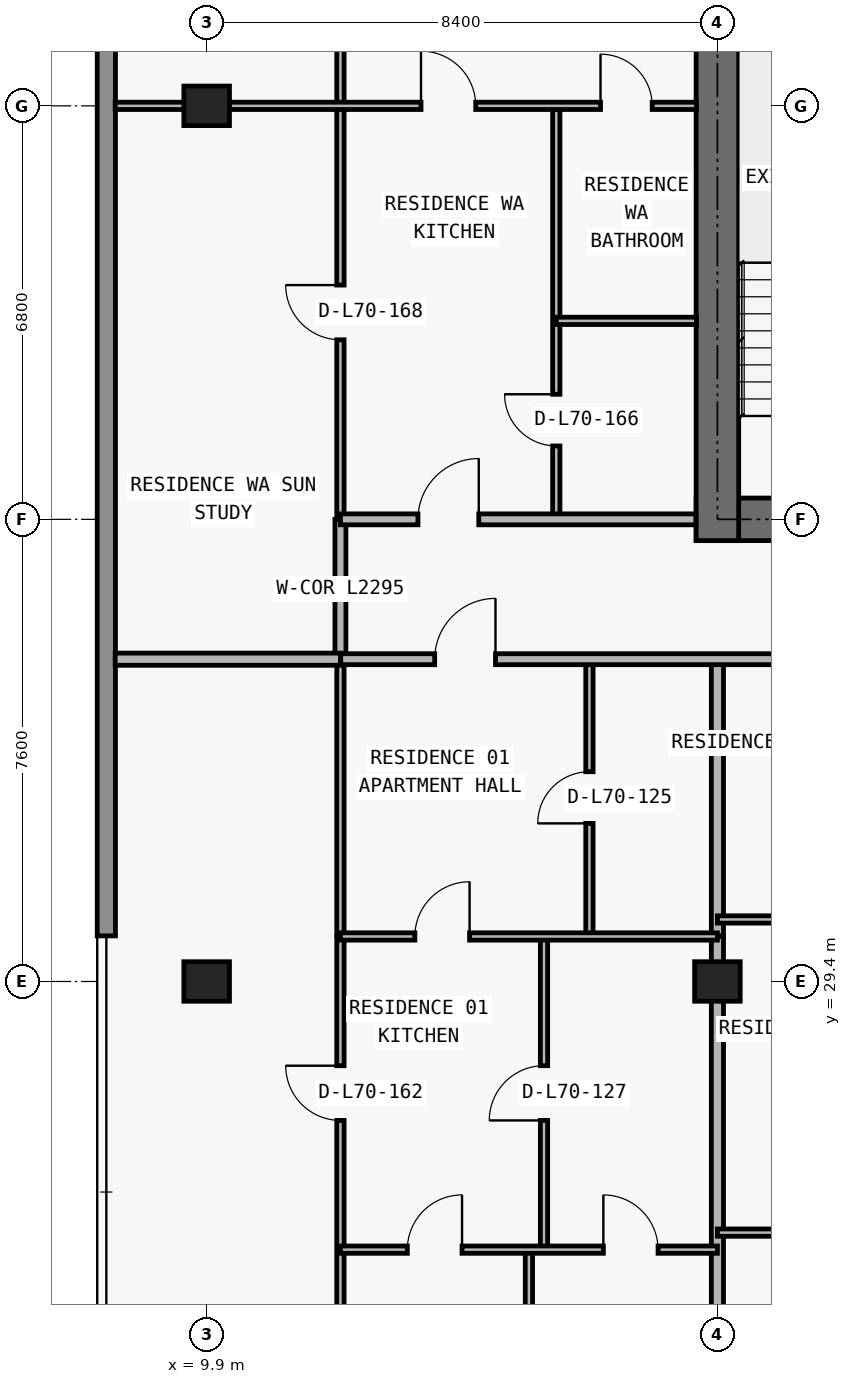
"""IFC4 building model, lengths in metres.
Left out: names, types, materials, properties, quantities, classifications, styles, units other than length and angle.
Written with IfcOpenShell. Run it as: python <this file> out.ifc"""

import sys

from ifc_helpers import new_model, si_unit, direction, frame, frame_2d, origin, origin_2d, place, context, subcontext, project, spatial, rectangle, extrude, element, fill, save


model = new_model("IFC4")
c1 = context("Model", 3, precision=1e-05, world=origin(), true_north=direction((0.0, 1.0)))
c2 = subcontext(c1, "Body", "Model", "MODEL_VIEW")
j1 = project(units=[si_unit("LENGTHUNIT", "METRE"), si_unit("PLANEANGLEUNIT", "RADIAN")], contexts=[c1])
p1 = place(None, origin())
s1 = spatial("IfcSite", under=j1, at=p1, CompositionType="ELEMENT")
p2 = place(p1, origin())
s2 = spatial("IfcBuilding", under=s1, at=p2, CompositionType="ELEMENT")
p3 = place(p2, frame((0.0, 0.0, 249.6)))
s3 = spatial("IfcBuildingStorey", under=s2, at=p3, CompositionType="ELEMENT", Elevation=249.6)
for number, where, z_axis, x_axis in (
    (1, (9.9, 29.4, 0.0), (0.0, 0.0, 1.0), (1.0, 0.0, 0.0)),
    (2, (18.3, 29.4, 0.0), (0.0, 0.0, 1.0), (1.0, 0.0, 0.0)),
    (3, (9.9, 43.8, 0.0), (0.0, 0.0, 1.0), (1.0, 0.0, 0.0)),
):
    element("IfcColumn", number, at=place(p3, frame(where, z_axis=z_axis, x_axis=x_axis)), inside=s3, PredefinedType="COLUMN", context=c2, shape_type="SweptSolid", body=[
        extrude(rectangle(XDim=0.75, YDim=0.65, at=origin_2d()), origin(), (0.0, 0.0, 1.0), 3.05),
    ])
p4 = place(p3, frame((17.95, 37.0, 0.0), z_axis=(0.0, 0.0, 1.0), x_axis=(1.0, 0.0, 0.0)))
e4 = element("IfcWall", 4, at=p4, inside=s3, PredefinedType="SHEAR", context=c2, shape_type="SweptSolid", body=[
    extrude(rectangle(XDim=41.9, YDim=0.7, at=frame_2d((20.95, 0.0))), origin(), (0.0, 0.0, 1.0), 3.05),
])
p5 = place(p4, frame((14.35, 0.0, 0.0)))
e5 = element("IfcOpeningElement", 5, at=p5, cuts=e4, PredefinedType="OPENING", context=c2, shape_type="SweptSolid", body=[
    extrude(rectangle(XDim=1.1, YDim=2.15, at=frame_2d((0.55, 1.075))), frame((0.0, 0.36, 0.0), z_axis=(0.0, -1.0, 0.0), x_axis=(1.0, 0.0, 0.0)), (0.0, 0.0, 1.0), 0.72),
])
p6 = place(p4, frame((6.2, 0.0, 0.0)))
e6 = element("IfcOpeningElement", 6, at=p6, cuts=e4, PredefinedType="OPENING", context=c2, shape_type="SweptSolid", body=[
    extrude(rectangle(XDim=1.05, YDim=2.15, at=frame_2d((0.525, 1.075))), frame((0.0, 0.36, 0.0), z_axis=(0.0, -1.0, 0.0), x_axis=(1.0, 0.0, 0.0)), (0.0, 0.0, 1.0), 0.72),
])
p7 = place(p4, frame((34.7, 0.0, 0.0)))
e7 = element("IfcOpeningElement", 7, at=p7, cuts=e4, PredefinedType="OPENING", context=c2, shape_type="SweptSolid", body=[
    extrude(rectangle(XDim=1.05, YDim=2.15, at=frame_2d((0.525, 1.075))), frame((0.0, 0.36, 0.0), z_axis=(0.0, -1.0, 0.0), x_axis=(1.0, 0.0, 0.0)), (0.0, 0.0, 1.0), 0.72),
])
p8 = place(p4, frame((10.812, 0.0, 0.0)))
e8 = element("IfcOpeningElement", 8, at=p8, cuts=e4, PredefinedType="OPENING", context=c2, shape_type="SweptSolid", body=[
    extrude(rectangle(XDim=1.05, YDim=2.15, at=frame_2d((0.525, 1.075))), frame((0.0, 0.36, 0.0), z_axis=(0.0, -1.0, 0.0), x_axis=(1.0, 0.0, 0.0)), (0.0, 0.0, 1.0), 0.72),
])
p9 = place(p4, frame((24.05, 0.0, 0.0)))
e9 = element("IfcOpeningElement", 9, at=p9, cuts=e4, PredefinedType="OPENING", context=c2, shape_type="SweptSolid", body=[
    extrude(rectangle(XDim=1.05, YDim=2.15, at=frame_2d((0.525, 1.075))), frame((0.0, 0.36, 0.0), z_axis=(0.0, -1.0, 0.0), x_axis=(1.0, 0.0, 0.0)), (0.0, 0.0, 1.0), 0.72),
])
p10 = place(p3, frame((18.3, 36.65, 0.0), z_axis=(0.0, 0.0, 1.0), x_axis=(0.0, 1.0, 0.0)))
e10 = element("IfcWall", 10, at=p10, inside=s3, PredefinedType="SHEAR", context=c2, shape_type="SweptSolid", body=[
    extrude(rectangle(XDim=13.95, YDim=0.7, at=frame_2d((6.975, 0.0))), origin(), (0.0, 0.0, 1.0), 3.05),
])
p11 = place(p3, frame((8.25, 30.15, 0.0), z_axis=(0.0, 0.0, 1.0), x_axis=(0.0, 1.0, 0.0)))
e11 = element("IfcWall", 11, at=p11, inside=s3, PredefinedType="STANDARD", context=c2, shape_type="SweptSolid", body=[
    extrude(rectangle(XDim=16.85, YDim=0.3, at=frame_2d((8.425, 0.0))), origin(), (0.0, 0.0, 1.0), 3.05),
])
p12 = place(p3, frame((12.1, 13.385, 0.0), z_axis=(0.0, 0.0, 1.0), x_axis=(0.0, 1.0, 0.0)))
e12 = element("IfcWall", 12, at=p12, inside=s3, PredefinedType="PARTITIONING", context=c2, shape_type="SweptSolid", body=[
    extrude(rectangle(XDim=16.755, YDim=0.12, at=frame_2d((8.377, 0.0))), origin(), (0.0, 0.0, 1.0), 2.578),
])
p13 = place(p12, frame((13.73, 0.0, 0.0)))
e13 = element("IfcOpeningElement", 13, at=p13, cuts=e12, PredefinedType="OPENING", context=c2, shape_type="SweptSolid", body=[
    extrude(rectangle(XDim=0.9, YDim=2.15, at=frame_2d((0.45, 1.075))), frame((0.0, 0.07, 0.0), z_axis=(0.0, -1.0, 0.0), x_axis=(1.0, 0.0, 0.0)), (0.0, 0.0, 1.0), 0.14),
])
p14 = place(p3, frame((12.1, 30.15, 0.0), z_axis=(0.0, 0.0, 1.0), x_axis=(0.0, 1.0, 0.0)))
e14 = element("IfcWall", 14, at=p14, inside=s3, PredefinedType="PARTITIONING", context=c2, shape_type="SweptSolid", body=[
    extrude(rectangle(XDim=4.55, YDim=0.12, at=frame_2d((2.275, 0.0))), origin(), (0.0, 0.0, 1.0), 2.578),
])
p15 = place(p3, frame((12.1, 34.705, 0.0), z_axis=(0.0, 0.0, 1.0), x_axis=(0.0, 1.0, 0.0)))
e15 = element("IfcWall", 15, at=p15, inside=s3, PredefinedType="PARTITIONING", context=c2, shape_type="SweptSolid", body=[
    extrude(rectangle(XDim=2.295, YDim=0.18, at=frame_2d((1.147, 0.0))), origin(), (0.0, 0.0, 1.0), 2.578),
])
p16 = place(p3, frame((12.1, 37.005, 0.0), z_axis=(0.0, 0.0, 1.0), x_axis=(0.0, 1.0, 0.0)))
e16 = element("IfcWall", 16, at=p16, inside=s3, PredefinedType="PARTITIONING", context=c2, shape_type="SweptSolid", body=[
    extrude(rectangle(XDim=9.875, YDim=0.12, at=frame_2d((4.938, 0.0))), origin(), (0.0, 0.0, 1.0), 2.578),
])
p17 = place(p16, frame((2.948, 0.0, 0.0)))
e17 = element("IfcOpeningElement", 17, at=p17, cuts=e16, PredefinedType="OPENING", context=c2, shape_type="SweptSolid", body=[
    extrude(rectangle(XDim=0.9, YDim=2.15, at=frame_2d((0.45, 1.075))), frame((0.0, 0.07, 0.0), z_axis=(0.0, -1.0, 0.0), x_axis=(1.0, 0.0, 0.0)), (0.0, 0.0, 1.0), 0.14),
])
p18 = place(p16, frame((7.885, 0.0, 0.0)))
e18 = element("IfcOpeningElement", 18, at=p18, cuts=e16, PredefinedType="OPENING", context=c2, shape_type="SweptSolid", body=[
    extrude(rectangle(XDim=0.9, YDim=2.15, at=frame_2d((0.45, 1.075))), frame((0.0, 0.07, 0.0), z_axis=(0.0, -1.0, 0.0), x_axis=(1.0, 0.0, 0.0)), (0.0, 0.0, 1.0), 0.14),
])
p19 = place(p3, frame((15.2, 13.34, 0.0), z_axis=(0.0, 0.0, 1.0), x_axis=(0.0, 1.0, 0.0)))
e19 = element("IfcWall", 19, at=p19, inside=s3, PredefinedType="PARTITIONING", context=c2, shape_type="SweptSolid", body=[
    extrude(rectangle(XDim=11.65, YDim=0.12, at=frame_2d((5.825, 0.0))), origin(), (0.0, 0.0, 1.0), 3.05),
])
p20 = place(p3, frame((15.448, 24.99, 0.0), z_axis=(0.0, 0.0, 1.0), x_axis=(0.0, 1.0, 0.0)))
e20 = element("IfcWall", 20, at=p20, inside=s3, PredefinedType="PARTITIONING", context=c2, shape_type="SweptSolid", body=[
    extrude(rectangle(XDim=5.15, YDim=0.12, at=frame_2d((2.575, 0.0))), origin(), (0.0, 0.0, 1.0), 3.05),
])
p21 = place(p20, frame((2.125, 0.0, 0.0)))
e21 = element("IfcOpeningElement", 21, at=p21, cuts=e20, PredefinedType="OPENING", context=c2, shape_type="SweptSolid", body=[
    extrude(rectangle(XDim=0.9, YDim=2.15, at=frame_2d((0.45, 1.075))), frame((0.0, 0.07, 0.0), z_axis=(0.0, -1.0, 0.0), x_axis=(1.0, 0.0, 0.0)), (0.0, 0.0, 1.0), 0.14),
])
p22 = place(p3, frame((15.65, 37.0, 0.0), z_axis=(0.0, 0.0, 1.0), x_axis=(0.0, 1.0, 0.0)))
e22 = element("IfcWall", 22, at=p22, inside=s3, PredefinedType="PARTITIONING", context=c2, shape_type="SweptSolid", body=[
    extrude(rectangle(XDim=6.8, YDim=0.12, at=frame_2d((3.4, 0.0))), origin(), (0.0, 0.0, 1.0), 3.05),
])
p23 = place(p22, frame((1.207, 0.0, 0.0)))
e23 = element("IfcOpeningElement", 23, at=p23, cuts=e22, PredefinedType="OPENING", context=c2, shape_type="SweptSolid", body=[
    extrude(rectangle(XDim=0.85, YDim=2.1, at=frame_2d((0.425, 1.05))), frame((0.0, 0.07, 0.0), z_axis=(0.0, -1.0, 0.0), x_axis=(1.0, 0.0, 0.0)), (0.0, 0.0, 1.0), 0.14),
])
p24 = place(p3, frame((16.195, 30.15, 0.0), z_axis=(0.0, 0.0, 1.0), x_axis=(0.0, 1.0, 0.0)))
e24 = element("IfcWall", 24, at=p24, inside=s3, PredefinedType="PARTITIONING", context=c2, shape_type="SweptSolid", body=[
    extrude(rectangle(XDim=4.55, YDim=0.12, at=frame_2d((2.275, 0.0))), origin(), (0.0, 0.0, 1.0), 3.05),
])
p25 = place(p24, frame((1.85, 0.0, 0.0)))
e25 = element("IfcOpeningElement", 25, at=p25, cuts=e24, PredefinedType="OPENING", context=c2, shape_type="SweptSolid", body=[
    extrude(rectangle(XDim=0.85, YDim=2.1, at=frame_2d((0.425, 1.05))), frame((0.0, 0.07, 0.0), z_axis=(0.0, -1.0, 0.0), x_axis=(1.0, 0.0, 0.0)), (0.0, 0.0, 1.0), 0.14),
])
p26 = place(p3, frame((18.3, 13.34, 0.0), z_axis=(0.0, 0.0, 1.0), x_axis=(0.0, 1.0, 0.0)))
e26 = element("IfcWall", 26, at=p26, inside=s3, PredefinedType="PARTITIONING", context=c2, shape_type="SweptSolid", body=[
    extrude(rectangle(XDim=16.8, YDim=0.2, at=frame_2d((8.4, 0.0))), origin(), (0.0, 0.0, 1.0), 2.263),
])
p27 = place(p3, frame((18.3, 30.15, 0.0), z_axis=(0.0, 0.0, 1.0), x_axis=(0.0, 1.0, 0.0)))
e27 = element("IfcWall", 27, at=p27, inside=s3, PredefinedType="PARTITIONING", context=c2, shape_type="SweptSolid", body=[
    extrude(rectangle(XDim=4.55, YDim=0.2, at=frame_2d((2.275, 0.0))), origin(), (0.0, 0.0, 1.0), 2.263),
])
p28 = place(p3, frame((12.1, 24.99, 0.0), z_axis=(0.0, 0.0, 1.0), x_axis=(1.0, 0.0, 0.0)))
e28 = element("IfcWall", 28, at=p28, inside=s3, PredefinedType="PARTITIONING", context=c2, shape_type="SweptSolid", body=[
    extrude(rectangle(XDim=6.2, YDim=0.12, at=frame_2d((3.1, 0.0))), origin(), (0.0, 0.0, 1.0), 3.05),
])
p29 = place(p28, frame((1.1, 0.0, 0.0)))
e29 = element("IfcOpeningElement", 29, at=p29, cuts=e28, PredefinedType="OPENING", context=c2, shape_type="SweptSolid", body=[
    extrude(rectangle(XDim=0.9, YDim=2.15, at=frame_2d((0.45, 1.075))), frame((0.0, 0.07, 0.0), z_axis=(0.0, -1.0, 0.0), x_axis=(1.0, 0.0, 0.0)), (0.0, 0.0, 1.0), 0.14),
])
p30 = place(p28, frame((4.324, 0.0, 0.0)))
e30 = element("IfcOpeningElement", 30, at=p30, cuts=e28, PredefinedType="OPENING", context=c2, shape_type="SweptSolid", body=[
    extrude(rectangle(XDim=0.9, YDim=2.15, at=frame_2d((0.45, 1.075))), frame((0.0, 0.07, 0.0), z_axis=(0.0, -1.0, 0.0), x_axis=(1.0, 0.0, 0.0)), (0.0, 0.0, 1.0), 0.14),
])
p31 = place(p3, frame((18.3, 25.27, 0.0), z_axis=(0.0, 0.0, 1.0), x_axis=(1.0, 0.0, 0.0)))
e31 = element("IfcWall", 31, at=p31, inside=s3, PredefinedType="PARTITIONING", context=c2, shape_type="SweptSolid", body=[
    extrude(rectangle(XDim=8.18, YDim=0.12, at=frame_2d((4.09, 0.0))), origin(), (0.0, 0.0, 1.0), 3.05),
])
p32 = place(p31, frame((1.86, 0.0, 0.0)))
e32 = element("IfcOpeningElement", 32, at=p32, cuts=e31, PredefinedType="OPENING", context=c2, shape_type="SweptSolid", body=[
    extrude(rectangle(XDim=0.9, YDim=2.15, at=frame_2d((0.45, 1.075))), frame((0.0, 0.07, 0.0), z_axis=(0.0, -1.0, 0.0), x_axis=(1.0, 0.0, 0.0)), (0.0, 0.0, 1.0), 0.14),
])
p33 = place(p31, frame((6.033, 0.0, 0.0)))
e33 = element("IfcOpeningElement", 33, at=p33, cuts=e31, PredefinedType="OPENING", context=c2, shape_type="SweptSolid", body=[
    extrude(rectangle(XDim=0.9, YDim=2.15, at=frame_2d((0.45, 1.075))), frame((0.0, 0.07, 0.0), z_axis=(0.0, -1.0, 0.0), x_axis=(1.0, 0.0, 0.0)), (0.0, 0.0, 1.0), 0.14),
])
p34 = place(p3, frame((12.1, 30.14, 0.0), z_axis=(0.0, 0.0, 1.0), x_axis=(1.0, 0.0, 0.0)))
e34 = element("IfcWall", 34, at=p34, inside=s3, PredefinedType="PARTITIONING", context=c2, shape_type="SweptSolid", body=[
    extrude(rectangle(XDim=6.2, YDim=0.12, at=frame_2d((3.1, 0.0))), origin(), (0.0, 0.0, 1.0), 3.05),
])
p35 = place(p34, frame((1.224, 0.0, 0.0)))
e35 = element("IfcOpeningElement", 35, at=p35, cuts=e34, PredefinedType="OPENING", context=c2, shape_type="SweptSolid", body=[
    extrude(rectangle(XDim=0.9, YDim=2.15, at=frame_2d((0.45, 1.075))), frame((0.0, 0.07, 0.0), z_axis=(0.0, -1.0, 0.0), x_axis=(1.0, 0.0, 0.0)), (0.0, 0.0, 1.0), 0.14),
])
p36 = place(p3, frame((18.3, 30.42, 0.0), z_axis=(0.0, 0.0, 1.0), x_axis=(1.0, 0.0, 0.0)))
e36 = element("IfcWall", 36, at=p36, inside=s3, PredefinedType="PARTITIONING", context=c2, shape_type="SweptSolid", body=[
    extrude(rectangle(XDim=8.35, YDim=0.12, at=frame_2d((4.175, 0.0))), origin(), (0.0, 0.0, 1.0), 3.05),
])
p37 = place(p36, frame((1.943, 0.0, 0.0)))
e37 = element("IfcOpeningElement", 37, at=p37, cuts=e36, PredefinedType="OPENING", context=c2, shape_type="SweptSolid", body=[
    extrude(rectangle(XDim=0.9, YDim=2.15, at=frame_2d((0.45, 1.075))), frame((0.0, 0.07, 0.0), z_axis=(0.0, -1.0, 0.0), x_axis=(1.0, 0.0, 0.0)), (0.0, 0.0, 1.0), 0.14),
])
p38 = place(p3, frame((8.395, 34.7, 0.0), z_axis=(0.0, 0.0, 1.0), x_axis=(1.0, 0.0, 0.0)))
e38 = element("IfcWall", 38, at=p38, inside=s3, PredefinedType="PARTITIONING", context=c2, shape_type="SweptSolid", body=[
    extrude(rectangle(XDim=3.705, YDim=0.2, at=frame_2d((1.853, 0.0))), origin(), (0.0, 0.0, 1.0), 3.05),
])
p39 = place(p3, frame((12.105, 34.7, 0.0), z_axis=(0.0, 0.0, 1.0), x_axis=(1.0, 0.0, 0.0)))
e39 = element("IfcWall", 39, at=p39, inside=s3, PredefinedType="PARTITIONING", context=c2, shape_type="SweptSolid", body=[
    extrude(rectangle(XDim=14.545, YDim=0.18, at=frame_2d((7.272, 0.0))), origin(), (0.0, 0.0, 1.0), 3.05),
])
p40 = place(p39, frame((1.545, 0.0, 0.0)))
e40 = element("IfcOpeningElement", 40, at=p40, cuts=e39, PredefinedType="OPENING", context=c2, shape_type="SweptSolid", body=[
    extrude(rectangle(XDim=1.0, YDim=2.2, at=frame_2d((0.5, 1.1))), frame((0.0, 0.1, 0.0), z_axis=(0.0, -1.0, 0.0), x_axis=(1.0, 0.0, 0.0)), (0.0, 0.0, 1.0), 0.2),
])
p41 = place(p39, frame((8.691, 0.0, 0.0)))
e41 = element("IfcOpeningElement", 41, at=p41, cuts=e39, PredefinedType="OPENING", context=c2, shape_type="SweptSolid", body=[
    extrude(rectangle(XDim=1.0, YDim=2.2, at=frame_2d((0.5, 1.1))), frame((0.0, 0.1, 0.0), z_axis=(0.0, -1.0, 0.0), x_axis=(1.0, 0.0, 0.0)), (0.0, 0.0, 1.0), 0.2),
])
p42 = place(p3, frame((12.1, 37.0, 0.0), z_axis=(0.0, 0.0, 1.0), x_axis=(1.0, 0.0, 0.0)))
e42 = element("IfcWall", 42, at=p42, inside=s3, PredefinedType="PARTITIONING", context=c2, shape_type="SweptSolid", body=[
    extrude(rectangle(XDim=5.845, YDim=0.18, at=frame_2d((2.922, 0.0))), origin(), (0.0, 0.0, 1.0), 3.05),
])
p43 = place(p42, frame((1.275, 0.0, 0.0)))
e43 = element("IfcOpeningElement", 43, at=p43, cuts=e42, PredefinedType="OPENING", context=c2, shape_type="SweptSolid", body=[
    extrude(rectangle(XDim=1.0, YDim=2.2, at=frame_2d((0.5, 1.1))), frame((0.0, 0.1, 0.0), z_axis=(0.0, -1.0, 0.0), x_axis=(1.0, 0.0, 0.0)), (0.0, 0.0, 1.0), 0.2),
])
p44 = place(p3, frame((15.65, 40.264, 0.0), z_axis=(0.0, 0.0, 1.0), x_axis=(1.0, 0.0, 0.0)))
e44 = element("IfcWall", 44, at=p44, inside=s3, PredefinedType="PARTITIONING", context=c2, shape_type="SweptSolid", body=[
    extrude(rectangle(XDim=2.305, YDim=0.12, at=frame_2d((1.153, 0.0))), origin(), (0.0, 0.0, 1.0), 3.05),
])
p45 = place(p3, frame((8.395, 43.8, 0.0), z_axis=(0.0, 0.0, 1.0), x_axis=(1.0, 0.0, 0.0)))
e45 = element("IfcWall", 45, at=p45, inside=s3, PredefinedType="PARTITIONING", context=c2, shape_type="SweptSolid", body=[
    extrude(rectangle(XDim=9.56, YDim=0.12, at=frame_2d((4.78, 0.0))), origin(), (0.0, 0.0, 1.0), 2.418),
])
p46 = place(p45, frame((5.03, 0.0, 0.0)))
e46 = element("IfcOpeningElement", 46, at=p46, cuts=e45, PredefinedType="OPENING", context=c2, shape_type="SweptSolid", body=[
    extrude(rectangle(XDim=0.9, YDim=2.15, at=frame_2d((0.45, 1.075))), frame((0.0, 0.07, 0.0), z_axis=(0.0, -1.0, 0.0), x_axis=(1.0, 0.0, 0.0)), (0.0, 0.0, 1.0), 0.14),
])
p47 = place(p45, frame((7.982, 0.0, 0.0)))
e47 = element("IfcOpeningElement", 47, at=p47, cuts=e45, PredefinedType="OPENING", context=c2, shape_type="SweptSolid", body=[
    extrude(rectangle(XDim=0.85, YDim=2.1, at=frame_2d((0.425, 1.05))), frame((0.0, 0.07, 0.0), z_axis=(0.0, -1.0, 0.0), x_axis=(1.0, 0.0, 0.0)), (0.0, 0.0, 1.0), 0.14),
])
p48 = place(p40, origin())
e48 = element("IfcDoor", 48, at=p48, inside=s3, OperationType="SINGLE_SWING_RIGHT", PredefinedType="DOOR", context=c2, shape_type="SweptSolid", body=[
    extrude(rectangle(XDim=1.0, YDim=2.2, at=frame_2d((0.5, 1.1))), frame((0.0, 0.025, 0.0), z_axis=(0.0, -1.0, 0.0), x_axis=(1.0, 0.0, 0.0)), (0.0, 0.0, 1.0), 0.05),
])
fill(e40, e48)
p49 = place(p25, origin())
e49 = element("IfcDoor", 49, at=p49, inside=s3, OperationType="SINGLE_SWING_LEFT", PredefinedType="DOOR", context=c2, shape_type="SweptSolid", body=[
    extrude(rectangle(XDim=0.85, YDim=2.1, at=frame_2d((0.425, 1.05))), frame((0.0, 0.025, 0.0), z_axis=(0.0, -1.0, 0.0), x_axis=(1.0, 0.0, 0.0)), (0.0, 0.0, 1.0), 0.05),
])
fill(e25, e49)
p50 = place(p35, origin())
e50 = element("IfcDoor", 50, at=p50, inside=s3, OperationType="SINGLE_SWING_RIGHT", PredefinedType="DOOR", context=c2, shape_type="SweptSolid", body=[
    extrude(rectangle(XDim=0.9, YDim=2.15, at=frame_2d((0.45, 1.075))), frame((0.0, 0.025, 0.0), z_axis=(0.0, -1.0, 0.0), x_axis=(1.0, 0.0, 0.0)), (0.0, 0.0, 1.0), 0.05),
])
fill(e35, e50)
p51 = place(p21, origin())
e51 = element("IfcDoor", 51, at=p51, inside=s3, OperationType="SINGLE_SWING_LEFT", PredefinedType="DOOR", context=c2, shape_type="SweptSolid", body=[
    extrude(rectangle(XDim=0.9, YDim=2.15, at=frame_2d((0.45, 1.075))), frame((0.0, 0.025, 0.0), z_axis=(0.0, -1.0, 0.0), x_axis=(1.0, 0.0, 0.0)), (0.0, 0.0, 1.0), 0.05),
])
fill(e21, e51)
p52 = place(p29, origin())
e52 = element("IfcDoor", 52, at=p52, inside=s3, OperationType="SINGLE_SWING_RIGHT", PredefinedType="DOOR", context=c2, shape_type="SweptSolid", body=[
    extrude(rectangle(XDim=0.9, YDim=2.15, at=frame_2d((0.45, 1.075))), frame((0.0, 0.025, 0.0), z_axis=(0.0, -1.0, 0.0), x_axis=(1.0, 0.0, 0.0)), (0.0, 0.0, 1.0), 0.05),
])
fill(e29, e52)
p53 = place(p30, origin())
e53 = element("IfcDoor", 53, at=p53, inside=s3, OperationType="SINGLE_SWING_LEFT", PredefinedType="DOOR", context=c2, shape_type="SweptSolid", body=[
    extrude(rectangle(XDim=0.9, YDim=2.15, at=frame_2d((0.45, 1.075))), frame((0.0, 0.025, 0.0), z_axis=(0.0, -1.0, 0.0), x_axis=(1.0, 0.0, 0.0)), (0.0, 0.0, 1.0), 0.05),
])
fill(e30, e53)
p54 = place(p13, origin())
e54 = element("IfcDoor", 54, at=p54, inside=s3, OperationType="SINGLE_SWING_RIGHT", PredefinedType="DOOR", context=c2, shape_type="SweptSolid", body=[
    extrude(rectangle(XDim=0.9, YDim=2.15, at=frame_2d((0.45, 1.075))), frame((0.0, 0.025, 0.0), z_axis=(0.0, -1.0, 0.0), x_axis=(1.0, 0.0, 0.0)), (0.0, 0.0, 1.0), 0.05),
])
fill(e13, e54)
p55 = place(p43, origin())
e55 = element("IfcDoor", 55, at=p55, inside=s3, OperationType="SINGLE_SWING_RIGHT", PredefinedType="DOOR", context=c2, shape_type="SweptSolid", body=[
    extrude(rectangle(XDim=1.0, YDim=2.2, at=frame_2d((0.5, 1.1))), frame((0.0, 0.025, 0.0), z_axis=(0.0, -1.0, 0.0), x_axis=(1.0, 0.0, 0.0)), (0.0, 0.0, 1.0), 0.05),
])
fill(e43, e55)
p56 = place(p46, origin())
e56 = element("IfcDoor", 56, at=p56, inside=s3, OperationType="SINGLE_SWING_LEFT", PredefinedType="DOOR", context=c2, shape_type="SweptSolid", body=[
    extrude(rectangle(XDim=0.9, YDim=2.15, at=frame_2d((0.45, 1.075))), frame((0.0, 0.025, 0.0), z_axis=(0.0, -1.0, 0.0), x_axis=(1.0, 0.0, 0.0)), (0.0, 0.0, 1.0), 0.05),
])
fill(e46, e56)
p57 = place(p23, origin())
e57 = element("IfcDoor", 57, at=p57, inside=s3, OperationType="SINGLE_SWING_RIGHT", PredefinedType="DOOR", context=c2, shape_type="SweptSolid", body=[
    extrude(rectangle(XDim=0.85, YDim=2.1, at=frame_2d((0.425, 1.05))), frame((0.0, 0.025, 0.0), z_axis=(0.0, -1.0, 0.0), x_axis=(1.0, 0.0, 0.0)), (0.0, 0.0, 1.0), 0.05),
])
fill(e23, e57)
p58 = place(p47, origin())
e58 = element("IfcDoor", 58, at=p58, inside=s3, OperationType="SINGLE_SWING_LEFT", PredefinedType="DOOR", context=c2, shape_type="SweptSolid", body=[
    extrude(rectangle(XDim=0.85, YDim=2.1, at=frame_2d((0.425, 1.05))), frame((0.0, 0.025, 0.0), z_axis=(0.0, -1.0, 0.0), x_axis=(1.0, 0.0, 0.0)), (0.0, 0.0, 1.0), 0.05),
])
fill(e47, e58)
p59 = place(p17, origin())
e59 = element("IfcDoor", 59, at=p59, inside=s3, OperationType="SINGLE_SWING_RIGHT", PredefinedType="DOOR", context=c2, shape_type="SweptSolid", body=[
    extrude(rectangle(XDim=0.9, YDim=2.15, at=frame_2d((0.45, 1.075))), frame((0.0, 0.025, 0.0), z_axis=(0.0, -1.0, 0.0), x_axis=(1.0, 0.0, 0.0)), (0.0, 0.0, 1.0), 0.05),
])
fill(e17, e59)
save(model, sys.argv[1])
